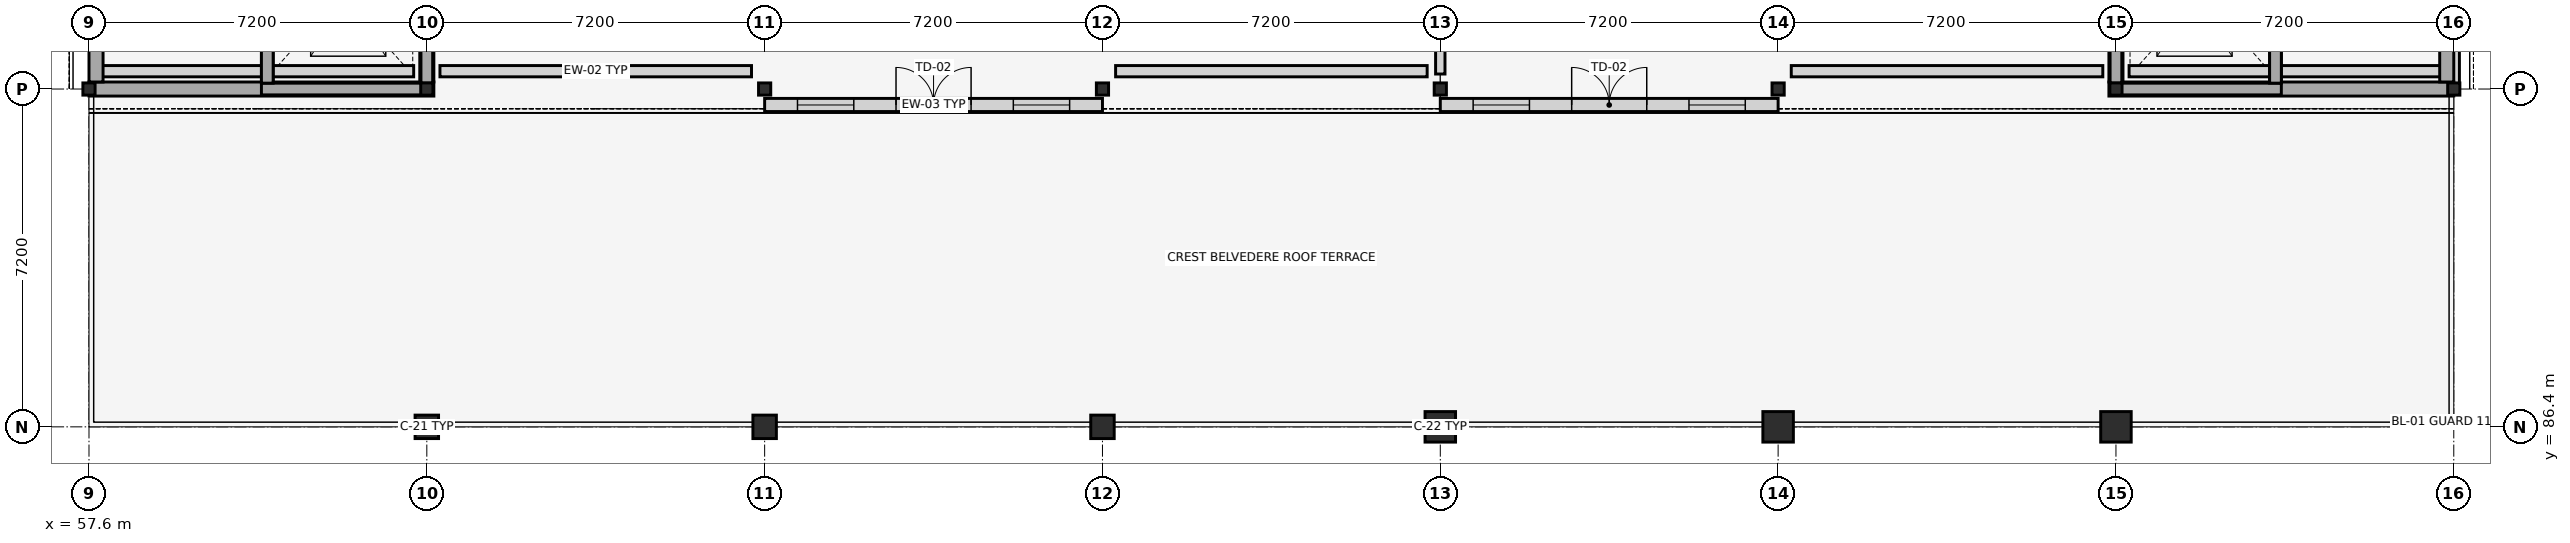
"""IFC4 building model, lengths in metres.
Left out: names, types, materials, properties, quantities, classifications, styles, units other than length and angle.
Written with IfcOpenShell. Run it as: python <this file> out.ifc"""

import sys

from ifc_helpers import new_model, si_unit, direction, frame, frame_2d, origin, origin_2d, place, context, subcontext, project, spatial, polyline, rectangle, circle, i_section, outline, extrude, element, fill, save


model = new_model("IFC4")
c1 = context("Model", 3, precision=1e-05, world=origin(), true_north=direction((0.0, 1.0)))
c2 = subcontext(c1, "Body", "Model", "MODEL_VIEW")
j1 = project(units=[si_unit("LENGTHUNIT", "METRE"), si_unit("PLANEANGLEUNIT", "RADIAN")], contexts=[c1])
p1 = place(None, origin())
s1 = spatial("IfcSite", under=j1, at=p1, CompositionType="ELEMENT")
p2 = place(p1, origin())
s2 = spatial("IfcBuilding", under=s1, at=p2, CompositionType="ELEMENT")
p3 = place(p2, frame((0.0, 0.0, 25.2)))
s3 = spatial("IfcBuildingStorey", under=s2, at=p3, CompositionType="ELEMENT", Elevation=25.2)
for number, where, z_axis, x_axis in (
    (1, (57.6, 93.6, 0.0), (0.0, 0.0, 1.0), (1.0, 0.0, 0.0)),
    (2, (64.8, 93.6, 0.0), (0.0, 0.0, 1.0), (0.0, 1.0, 0.0)),
    (3, (72.0, 93.6, 0.0), (0.0, 0.0, 1.0), (1.0, 0.0, 0.0)),
    (4, (79.2, 93.6, 0.0), (0.0, 0.0, 1.0), (0.0, 1.0, 0.0)),
    (5, (86.4, 93.6, 0.0), (0.0, 0.0, 1.0), (1.0, 0.0, 0.0)),
    (6, (93.6, 93.6, 0.0), (0.0, 0.0, 1.0), (0.0, 1.0, 0.0)),
    (7, (100.8, 93.6, 0.0), (0.0, 0.0, 1.0), (1.0, 0.0, 0.0)),
    (8, (108.0, 93.6, 0.0), (0.0, 0.0, 1.0), (0.0, 1.0, 0.0)),
):
    element("IfcColumn", number, at=place(p3, frame(where, z_axis=z_axis, x_axis=x_axis)), inside=s3, PredefinedType="COLUMN", context=c2, shape_type="SweptSolid", body=[
        extrude(i_section(OverallWidth=0.26, OverallDepth=0.26, WebThickness=0.01, FlangeThickness=0.018, FilletRadius=0.024, at=origin_2d()), origin(), (0.0, 0.0, 1.0), 5.4),
    ])
for number, where, z_axis, x_axis in (
    (9, (64.8, 86.4, 0.0), (0.0, 0.0, 1.0), (1.0, 0.0, 0.0)),
    (10, (72.0, 86.4, 0.0), (0.0, 0.0, 1.0), (1.0, 0.0, 0.0)),
    (11, (79.2, 86.4, 0.0), (0.0, 0.0, 1.0), (1.0, 0.0, 0.0)),
):
    element("IfcColumn", number, at=place(p3, frame(where, z_axis=z_axis, x_axis=x_axis)), inside=s3, PredefinedType="COLUMN", context=c2, shape_type="SweptSolid", body=[
        extrude(rectangle(XDim=0.5, YDim=0.5, at=origin_2d()), origin(), (0.0, 0.0, 1.0), 3.2),
    ])
for number, where, z_axis, x_axis in (
    (12, (86.4, 86.4, 0.0), (0.0, 0.0, 1.0), (1.0, 0.0, 0.0)),
    (13, (93.6, 86.4, 0.0), (0.0, 0.0, 1.0), (1.0, 0.0, 0.0)),
    (14, (100.8, 86.4, 0.0), (0.0, 0.0, 1.0), (1.0, 0.0, 0.0)),
):
    element("IfcColumn", number, at=place(p3, frame(where, z_axis=z_axis, x_axis=x_axis)), inside=s3, PredefinedType="COLUMN", context=c2, shape_type="SweptSolid", body=[
        extrude(circle(Radius=0.325, at=origin_2d()), origin(), (0.0, 0.0, 1.0), 3.2),
    ])
p4 = place(p3, frame((57.88, 93.98, 0.0), z_axis=(0.0, 0.0, 1.0), x_axis=(1.0, 0.0, 0.0)))
e15 = element("IfcWall", 15, at=p4, inside=s3, PredefinedType="STANDARD", context=c2, shape_type="SweptSolid", body=[
    extrude(rectangle(XDim=6.64, YDim=0.24, at=frame_2d((3.32, 0.0))), origin(), (0.0, 0.0, 1.0), 4.78),
])
p5 = place(p3, frame((65.08, 93.98, 0.0), z_axis=(0.0, 0.0, 1.0), x_axis=(1.0, 0.0, 0.0)))
e16 = element("IfcWall", 16, at=p5, inside=s3, PredefinedType="STANDARD", context=c2, shape_type="SweptSolid", body=[
    extrude(rectangle(XDim=6.64, YDim=0.24, at=frame_2d((3.32, 0.0))), origin(), (0.0, 0.0, 1.0), 4.78),
])
p6 = place(p3, frame((72.0, 93.26, 0.0), z_axis=(0.0, 0.0, 1.0), x_axis=(1.0, 0.0, 0.0)))
e17 = element("IfcWall", 17, at=p6, inside=s3, PredefinedType="STANDARD", context=c2, shape_type="SweptSolid", body=[
    extrude(rectangle(XDim=7.2, YDim=0.28, at=frame_2d((3.6, 0.0))), origin(), (0.0, 0.0, 1.0), 5.4),
])
p7 = place(p6, frame((2.8, 0.0, 0.0)))
e18 = element("IfcOpeningElement", 18, at=p7, cuts=e17, PredefinedType="OPENING", context=c2, shape_type="SweptSolid", body=[
    extrude(rectangle(XDim=1.6, YDim=2.3, at=frame_2d((0.8, 1.15))), frame((0.0, 0.15, 0.0), z_axis=(0.0, -1.0, 0.0), x_axis=(1.0, 0.0, 0.0)), (0.0, 0.0, 1.0), 0.3),
])
p8 = place(p6, frame((0.7, 0.0, 0.85)))
e19 = element("IfcOpeningElement", 19, at=p8, cuts=e17, PredefinedType="OPENING", context=c2, shape_type="SweptSolid", body=[
    extrude(rectangle(XDim=1.2, YDim=2.2, at=frame_2d((0.6, 1.1))), frame((0.0, 0.15, 0.0), z_axis=(0.0, -1.0, 0.0), x_axis=(1.0, 0.0, 0.0)), (0.0, 0.0, 1.0), 0.3),
])
p9 = place(p6, frame((5.3, 0.0, 0.85)))
e20 = element("IfcOpeningElement", 20, at=p9, cuts=e17, PredefinedType="OPENING", context=c2, shape_type="SweptSolid", body=[
    extrude(rectangle(XDim=1.2, YDim=2.2, at=frame_2d((0.6, 1.1))), frame((0.0, 0.15, 0.0), z_axis=(0.0, -1.0, 0.0), x_axis=(1.0, 0.0, 0.0)), (0.0, 0.0, 1.0), 0.3),
])
p10 = place(p3, frame((79.48, 93.98, 0.0), z_axis=(0.0, 0.0, 1.0), x_axis=(1.0, 0.0, 0.0)))
e21 = element("IfcWall", 21, at=p10, inside=s3, PredefinedType="STANDARD", context=c2, shape_type="SweptSolid", body=[
    extrude(rectangle(XDim=6.64, YDim=0.24, at=frame_2d((3.32, 0.0))), origin(), (0.0, 0.0, 1.0), 4.78),
])
p11 = place(p3, frame((86.4, 93.26, 0.0), z_axis=(0.0, 0.0, 1.0), x_axis=(1.0, 0.0, 0.0)))
e22 = element("IfcWall", 22, at=p11, inside=s3, PredefinedType="STANDARD", context=c2, shape_type="SweptSolid", body=[
    extrude(rectangle(XDim=7.2, YDim=0.28, at=frame_2d((3.6, 0.0))), origin(), (0.0, 0.0, 1.0), 5.4),
])
p12 = place(p11, frame((2.8, 0.0, 0.0)))
e23 = element("IfcOpeningElement", 23, at=p12, cuts=e22, PredefinedType="OPENING", context=c2, shape_type="SweptSolid", body=[
    extrude(rectangle(XDim=1.6, YDim=2.3, at=frame_2d((0.8, 1.15))), frame((0.0, 0.15, 0.0), z_axis=(0.0, -1.0, 0.0), x_axis=(1.0, 0.0, 0.0)), (0.0, 0.0, 1.0), 0.3),
])
p13 = place(p11, frame((0.7, 0.0, 0.85)))
e24 = element("IfcOpeningElement", 24, at=p13, cuts=e22, PredefinedType="OPENING", context=c2, shape_type="SweptSolid", body=[
    extrude(rectangle(XDim=1.2, YDim=2.2, at=frame_2d((0.6, 1.1))), frame((0.0, 0.15, 0.0), z_axis=(0.0, -1.0, 0.0), x_axis=(1.0, 0.0, 0.0)), (0.0, 0.0, 1.0), 0.3),
])
p14 = place(p11, frame((5.3, 0.0, 0.85)))
e25 = element("IfcOpeningElement", 25, at=p14, cuts=e22, PredefinedType="OPENING", context=c2, shape_type="SweptSolid", body=[
    extrude(rectangle(XDim=1.2, YDim=2.2, at=frame_2d((0.6, 1.1))), frame((0.0, 0.15, 0.0), z_axis=(0.0, -1.0, 0.0), x_axis=(1.0, 0.0, 0.0)), (0.0, 0.0, 1.0), 0.3),
])
p15 = place(p3, frame((93.88, 93.98, 0.0), z_axis=(0.0, 0.0, 1.0), x_axis=(1.0, 0.0, 0.0)))
e26 = element("IfcWall", 26, at=p15, inside=s3, PredefinedType="STANDARD", context=c2, shape_type="SweptSolid", body=[
    extrude(rectangle(XDim=6.64, YDim=0.24, at=frame_2d((3.32, 0.0))), origin(), (0.0, 0.0, 1.0), 4.78),
])
p16 = place(p3, frame((101.08, 93.98, 0.0), z_axis=(0.0, 0.0, 1.0), x_axis=(1.0, 0.0, 0.0)))
e27 = element("IfcWall", 27, at=p16, inside=s3, PredefinedType="STANDARD", context=c2, shape_type="SweptSolid", body=[
    extrude(rectangle(XDim=6.64, YDim=0.24, at=frame_2d((3.32, 0.0))), origin(), (0.0, 0.0, 1.0), 4.78),
])
p17 = place(p3, frame((108.0, 93.6, 5.42), z_axis=(0.0, 0.0, 1.0), x_axis=(0.0, 1.0, 0.0)))
e28 = element("IfcWall", 28, at=p17, inside=s3, PredefinedType="STANDARD", context=c2, shape_type="SweptSolid", body=[
    extrude(outline(polyline([(0.0, 0.0), (7.2, 0.0), (7.2, 6.46), (0.0, 0.13), (0.0, 0.0)])), frame((0.0, 0.12, 0.0), z_axis=(0.0, -1.0, 0.0), x_axis=(1.0, 0.0, 0.0)), (0.0, 0.0, 1.0), 0.24),
])
p18 = place(p3, frame((57.6, 93.6, 0.0), z_axis=(0.0, 0.0, 1.0), x_axis=(1.0, 0.0, 0.0)))
e29 = element("IfcWall", 29, at=p18, inside=s3, PredefinedType="SHEAR", context=c2, shape_type="SweptSolid", body=[
    extrude(rectangle(XDim=7.35, YDim=0.3, at=frame_2d((3.675, 0.0))), origin(), (0.0, 0.0, 1.0), 5.18),
])
p19 = place(p3, frame((57.75, 93.75, 0.0), z_axis=(0.0, 0.0, 1.0), x_axis=(0.0, 1.0, 0.0)))
e30 = element("IfcWall", 30, at=p19, inside=s3, PredefinedType="SHEAR", context=c2, shape_type="SweptSolid", body=[
    extrude(rectangle(XDim=14.1, YDim=0.3, at=frame_2d((7.05, 0.0))), origin(), (0.0, 0.0, 1.0), 5.18),
])
p20 = place(p3, frame((64.8, 93.75, 0.0), z_axis=(0.0, 0.0, 1.0), x_axis=(0.0, 1.0, 0.0)))
e31 = element("IfcWall", 31, at=p20, inside=s3, PredefinedType="SHEAR", context=c2, shape_type="SweptSolid", body=[
    extrude(rectangle(XDim=14.1, YDim=0.3, at=frame_2d((7.05, 0.0))), origin(), (0.0, 0.0, 1.0), 5.18),
])
p21 = place(p20, frame((3.55, 0.0, 0.0)))
e32 = element("IfcOpeningElement", 32, at=p21, cuts=e31, PredefinedType="OPENING", context=c2, shape_type="SweptSolid", body=[
    extrude(rectangle(XDim=1.3, YDim=2.2, at=frame_2d((0.65, 1.1))), frame((0.0, 0.16, 0.0), z_axis=(0.0, -1.0, 0.0), x_axis=(1.0, 0.0, 0.0)), (0.0, 0.0, 1.0), 0.32),
])
p22 = place(p20, frame((7.85, 0.0, 0.0)))
e33 = element("IfcOpeningElement", 33, at=p22, cuts=e31, PredefinedType="OPENING", context=c2, shape_type="SweptSolid", body=[
    extrude(rectangle(XDim=1.05, YDim=2.15, at=frame_2d((0.525, 1.075))), frame((0.0, 0.16, 0.0), z_axis=(0.0, -1.0, 0.0), x_axis=(1.0, 0.0, 0.0)), (0.0, 0.0, 1.0), 0.32),
])
p23 = place(p20, frame((10.55, 0.0, 0.0)))
e34 = element("IfcOpeningElement", 34, at=p23, cuts=e31, PredefinedType="OPENING", context=c2, shape_type="SweptSolid", body=[
    extrude(rectangle(XDim=1.0, YDim=2.15, at=frame_2d((0.5, 1.075))), frame((0.0, 0.16, 0.0), z_axis=(0.0, -1.0, 0.0), x_axis=(1.0, 0.0, 0.0)), (0.0, 0.0, 1.0), 0.32),
])
p24 = place(p3, frame((61.4, 93.75, 0.0), z_axis=(0.0, 0.0, 1.0), x_axis=(0.0, 1.0, 0.0)))
e35 = element("IfcWall", 35, at=p24, inside=s3, PredefinedType="SHEAR", context=c2, shape_type="SweptSolid", body=[
    extrude(rectangle(XDim=3.525, YDim=0.25, at=frame_2d((1.762, 0.0))), origin(), (0.0, 0.0, 1.0), 5.18),
])
p25 = place(p24, frame((1.2, 0.0, 0.0)))
e36 = element("IfcOpeningElement", 36, at=p25, cuts=e35, PredefinedType="OPENING", context=c2, shape_type="SweptSolid", body=[
    extrude(rectangle(XDim=1.1, YDim=2.15, at=frame_2d((0.55, 1.075))), frame((0.0, 0.135, 0.0), z_axis=(0.0, -1.0, 0.0), x_axis=(1.0, 0.0, 0.0)), (0.0, 0.0, 1.0), 0.27),
])
p26 = place(p3, frame((61.275, 93.6, 5.18), z_axis=(0.0, 0.0, 1.0), x_axis=(1.0, 0.0, 0.0)))
e37 = element("IfcWall", 37, at=p26, inside=s3, PredefinedType="SHEAR", context=c2, shape_type="SweptSolid", body=[
    extrude(rectangle(XDim=3.65, YDim=0.25, at=frame_2d((1.825, 0.0))), origin(), (0.0, 0.0, 1.0), 1.72),
])
for number, where, z_axis, x_axis in (
    (38, (64.8, 93.725, 5.18), (0.0, 0.0, 1.0), (0.0, 1.0, 0.0)),
    (39, (61.4, 97.275, 5.18), (0.0, 0.0, 1.0), (0.0, -1.0, 0.0)),
):
    element("IfcWall", number, at=place(p3, frame(where, z_axis=z_axis, x_axis=x_axis)), inside=s3, PredefinedType="SHEAR", context=c2, shape_type="SweptSolid", body=[
        extrude(rectangle(XDim=3.55, YDim=0.25, at=frame_2d((1.775, 0.0))), origin(), (0.0, 0.0, 1.0), 1.72),
    ])
p27 = place(p3, frame((100.65, 93.6, 0.0), z_axis=(0.0, 0.0, 1.0), x_axis=(1.0, 0.0, 0.0)))
e40 = element("IfcWall", 40, at=p27, inside=s3, PredefinedType="SHEAR", context=c2, shape_type="SweptSolid", body=[
    extrude(rectangle(XDim=7.35, YDim=0.3, at=frame_2d((3.675, 0.0))), origin(), (0.0, 0.0, 1.0), 5.18),
])
p28 = place(p3, frame((107.85, 93.75, 0.0), z_axis=(0.0, 0.0, 1.0), x_axis=(0.0, 1.0, 0.0)))
e41 = element("IfcWall", 41, at=p28, inside=s3, PredefinedType="SHEAR", context=c2, shape_type="SweptSolid", body=[
    extrude(rectangle(XDim=14.1, YDim=0.3, at=frame_2d((7.05, 0.0))), origin(), (0.0, 0.0, 1.0), 5.18),
])
p29 = place(p3, frame((100.8, 93.75, 0.0), z_axis=(0.0, 0.0, 1.0), x_axis=(0.0, 1.0, 0.0)))
e42 = element("IfcWall", 42, at=p29, inside=s3, PredefinedType="SHEAR", context=c2, shape_type="SweptSolid", body=[
    extrude(rectangle(XDim=14.1, YDim=0.3, at=frame_2d((7.05, 0.0))), origin(), (0.0, 0.0, 1.0), 5.18),
])
p30 = place(p29, frame((3.55, 0.0, 0.0)))
e43 = element("IfcOpeningElement", 43, at=p30, cuts=e42, PredefinedType="OPENING", context=c2, shape_type="SweptSolid", body=[
    extrude(rectangle(XDim=1.3, YDim=2.2, at=frame_2d((0.65, 1.1))), frame((0.0, 0.16, 0.0), z_axis=(0.0, -1.0, 0.0), x_axis=(1.0, 0.0, 0.0)), (0.0, 0.0, 1.0), 0.32),
])
p31 = place(p29, frame((7.85, 0.0, 0.0)))
e44 = element("IfcOpeningElement", 44, at=p31, cuts=e42, PredefinedType="OPENING", context=c2, shape_type="SweptSolid", body=[
    extrude(rectangle(XDim=1.05, YDim=2.15, at=frame_2d((0.525, 1.075))), frame((0.0, 0.16, 0.0), z_axis=(0.0, -1.0, 0.0), x_axis=(1.0, 0.0, 0.0)), (0.0, 0.0, 1.0), 0.32),
])
p32 = place(p29, frame((10.55, 0.0, 0.0)))
e45 = element("IfcOpeningElement", 45, at=p32, cuts=e42, PredefinedType="OPENING", context=c2, shape_type="SweptSolid", body=[
    extrude(rectangle(XDim=1.0, YDim=2.15, at=frame_2d((0.5, 1.075))), frame((0.0, 0.16, 0.0), z_axis=(0.0, -1.0, 0.0), x_axis=(1.0, 0.0, 0.0)), (0.0, 0.0, 1.0), 0.32),
])
p33 = place(p3, frame((104.2, 93.75, 0.0), z_axis=(0.0, 0.0, 1.0), x_axis=(0.0, 1.0, 0.0)))
e46 = element("IfcWall", 46, at=p33, inside=s3, PredefinedType="SHEAR", context=c2, shape_type="SweptSolid", body=[
    extrude(rectangle(XDim=3.525, YDim=0.25, at=frame_2d((1.762, 0.0))), origin(), (0.0, 0.0, 1.0), 5.18),
])
p34 = place(p33, frame((1.2, 0.0, 0.0)))
e47 = element("IfcOpeningElement", 47, at=p34, cuts=e46, PredefinedType="OPENING", context=c2, shape_type="SweptSolid", body=[
    extrude(rectangle(XDim=1.1, YDim=2.15, at=frame_2d((0.55, 1.075))), frame((0.0, 0.135, 0.0), z_axis=(0.0, -1.0, 0.0), x_axis=(1.0, 0.0, 0.0)), (0.0, 0.0, 1.0), 0.27),
])
p35 = place(p3, frame((100.675, 93.6, 5.18), z_axis=(0.0, 0.0, 1.0), x_axis=(1.0, 0.0, 0.0)))
e48 = element("IfcWall", 48, at=p35, inside=s3, PredefinedType="SHEAR", context=c2, shape_type="SweptSolid", body=[
    extrude(rectangle(XDim=3.65, YDim=0.25, at=frame_2d((1.825, 0.0))), origin(), (0.0, 0.0, 1.0), 1.72),
])
for number, where, z_axis, x_axis in (
    (49, (104.2, 93.725, 5.18), (0.0, 0.0, 1.0), (0.0, 1.0, 0.0)),
    (50, (100.8, 97.275, 5.18), (0.0, 0.0, 1.0), (0.0, -1.0, 0.0)),
):
    element("IfcWall", number, at=place(p3, frame(where, z_axis=z_axis, x_axis=x_axis)), inside=s3, PredefinedType="SHEAR", context=c2, shape_type="SweptSolid", body=[
        extrude(rectangle(XDim=3.55, YDim=0.25, at=frame_2d((1.775, 0.0))), origin(), (0.0, 0.0, 1.0), 1.72),
    ])
p36 = place(p3, frame((86.4, 93.92, 0.0), z_axis=(0.0, 0.0, 1.0), x_axis=(0.0, 1.0, 0.0)))
e51 = element("IfcWall", 51, at=p36, inside=s3, PredefinedType="PARTITIONING", context=c2, shape_type="SweptSolid", body=[
    extrude(rectangle(XDim=2.96, YDim=0.2, at=frame_2d((1.48, 0.0))), origin(), (0.0, 0.0, 1.0), 4.35),
])
p37 = place(p36, frame((0.98, 0.0, 0.0)))
e52 = element("IfcOpeningElement", 52, at=p37, cuts=e51, PredefinedType="OPENING", context=c2, shape_type="SweptSolid", body=[
    extrude(rectangle(XDim=1.0, YDim=2.15, at=frame_2d((0.5, 1.075))), frame((0.0, 0.11, 0.0), z_axis=(0.0, -1.0, 0.0), x_axis=(1.0, 0.0, 0.0)), (0.0, 0.0, 1.0), 0.22),
])
p38 = place(p7, origin())
e53 = element("IfcDoor", 53, at=p38, inside=s3, OperationType="DOUBLE_DOOR_SINGLE_SWING", PredefinedType="DOOR", context=c2, shape_type="SweptSolid", body=[
    extrude(rectangle(XDim=1.6, YDim=2.3, at=frame_2d((0.8, 1.15))), frame((0.0, 0.025, 0.0), z_axis=(0.0, -1.0, 0.0), x_axis=(1.0, 0.0, 0.0)), (0.0, 0.0, 1.0), 0.05),
])
fill(e18, e53)
p39 = place(p8, origin())
e54 = element("IfcWindow", 54, at=p39, inside=s3, PartitioningType="SINGLE_PANEL", PredefinedType="WINDOW", context=c2, shape_type="SweptSolid", body=[
    extrude(rectangle(XDim=1.2, YDim=2.2, at=frame_2d((0.6, 1.1))), frame((0.0, 0.03, 0.0), z_axis=(0.0, -1.0, 0.0), x_axis=(1.0, 0.0, 0.0)), (0.0, 0.0, 1.0), 0.06),
])
fill(e19, e54)
p40 = place(p9, origin())
e55 = element("IfcWindow", 55, at=p40, inside=s3, PartitioningType="SINGLE_PANEL", PredefinedType="WINDOW", context=c2, shape_type="SweptSolid", body=[
    extrude(rectangle(XDim=1.2, YDim=2.2, at=frame_2d((0.6, 1.1))), frame((0.0, 0.03, 0.0), z_axis=(0.0, -1.0, 0.0), x_axis=(1.0, 0.0, 0.0)), (0.0, 0.0, 1.0), 0.06),
])
fill(e20, e55)
p41 = place(p12, origin())
e56 = element("IfcDoor", 56, at=p41, inside=s3, OperationType="DOUBLE_DOOR_SINGLE_SWING", PredefinedType="DOOR", context=c2, shape_type="SweptSolid", body=[
    extrude(rectangle(XDim=1.6, YDim=2.3, at=frame_2d((0.8, 1.15))), frame((0.0, 0.025, 0.0), z_axis=(0.0, -1.0, 0.0), x_axis=(1.0, 0.0, 0.0)), (0.0, 0.0, 1.0), 0.05),
])
fill(e23, e56)
p42 = place(p13, origin())
e57 = element("IfcWindow", 57, at=p42, inside=s3, PartitioningType="SINGLE_PANEL", PredefinedType="WINDOW", context=c2, shape_type="SweptSolid", body=[
    extrude(rectangle(XDim=1.2, YDim=2.2, at=frame_2d((0.6, 1.1))), frame((0.0, 0.03, 0.0), z_axis=(0.0, -1.0, 0.0), x_axis=(1.0, 0.0, 0.0)), (0.0, 0.0, 1.0), 0.06),
])
fill(e24, e57)
p43 = place(p14, origin())
e58 = element("IfcWindow", 58, at=p43, inside=s3, PartitioningType="SINGLE_PANEL", PredefinedType="WINDOW", context=c2, shape_type="SweptSolid", body=[
    extrude(rectangle(XDim=1.2, YDim=2.2, at=frame_2d((0.6, 1.1))), frame((0.0, 0.03, 0.0), z_axis=(0.0, -1.0, 0.0), x_axis=(1.0, 0.0, 0.0)), (0.0, 0.0, 1.0), 0.06),
])
fill(e25, e58)
save(model, sys.argv[1])
